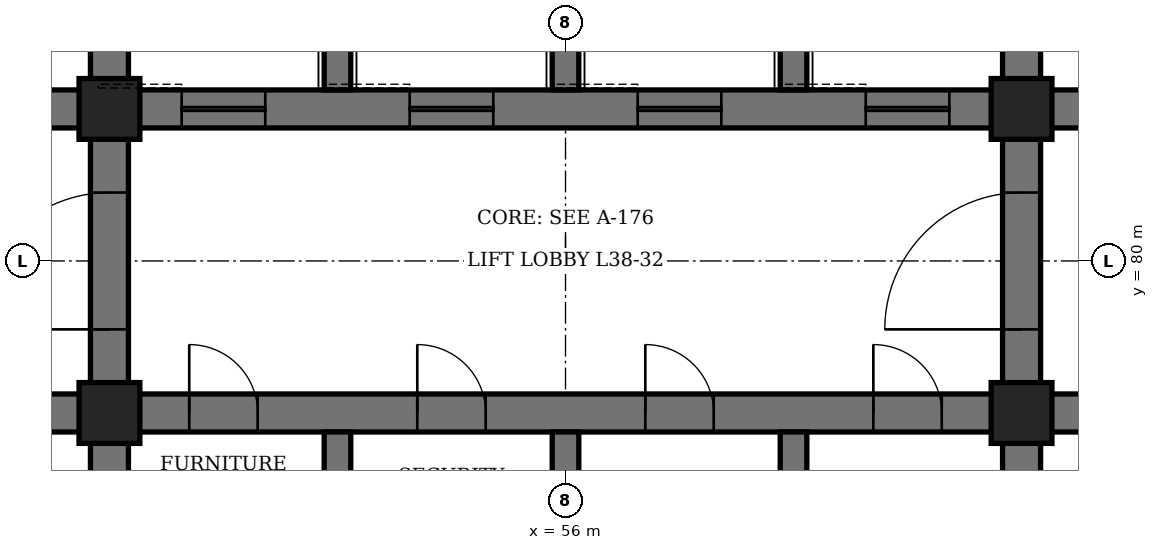
"""IFC4 building model, lengths in metres.
Left out: names, types, materials, properties, quantities, classifications, styles, units other than length and angle.
Written with IfcOpenShell. Run it as: python <this file> out.ifc"""

import sys

from ifc_helpers import new_model, si_unit, direction, frame, frame_2d, origin, origin_2d, place, context, subcontext, project, spatial, rectangle, hollow_rectangle, extrude, element, fill, save


model = new_model("IFC4")
c1 = context("Model", 3, precision=1e-05, world=origin(), true_north=direction((0.0, 1.0)))
c2 = subcontext(c1, "Body", "Model", "MODEL_VIEW")
j1 = project(units=[si_unit("LENGTHUNIT", "METRE"), si_unit("PLANEANGLEUNIT", "RADIAN")], contexts=[c1])
p1 = place(None, origin())
s1 = spatial("IfcSite", under=j1, at=p1, CompositionType="ELEMENT")
p2 = place(p1, origin())
s2 = spatial("IfcBuilding", under=s1, at=p2, CompositionType="ELEMENT")
p3 = place(p2, frame((0.0, 0.0, 171.1)))
s3 = spatial("IfcBuildingStorey", under=s2, at=p3, CompositionType="ELEMENT", Elevation=171.1)
p4 = place(p3, frame((50.0, 71.6, 0.0), z_axis=(0.0, 0.0, 1.0), x_axis=(0.0, 1.0, 0.0)))
e1 = element("IfcWall", 1, at=p4, inside=s3, PredefinedType="SHEAR", context=c2, shape_type="SweptSolid", body=[
    extrude(rectangle(XDim=16.8, YDim=0.5, at=frame_2d((8.4, 0.0))), origin(), (0.0, 0.0, 1.0), 4.2),
])
p5 = place(p4, frame((7.5, 0.0, 0.0)))
e2 = element("IfcOpeningElement", 2, at=p5, cuts=e1, PredefinedType="OPENING", context=c2, shape_type="SweptSolid", body=[
    extrude(rectangle(XDim=1.8, YDim=2.4, at=frame_2d((0.9, 1.2))), frame((0.0, 0.26, 0.0), z_axis=(0.0, -1.0, 0.0), x_axis=(1.0, 0.0, 0.0)), (0.0, 0.0, 1.0), 0.52),
])
p6 = place(p3, frame((62.0, 71.6, 0.0), z_axis=(0.0, 0.0, 1.0), x_axis=(0.0, 1.0, 0.0)))
e3 = element("IfcWall", 3, at=p6, inside=s3, PredefinedType="SHEAR", context=c2, shape_type="SweptSolid", body=[
    extrude(rectangle(XDim=16.8, YDim=0.5, at=frame_2d((8.4, 0.0))), origin(), (0.0, 0.0, 1.0), 4.2),
])
p7 = place(p6, frame((7.5, 0.0, 0.0)))
e4 = element("IfcOpeningElement", 4, at=p7, cuts=e3, PredefinedType="OPENING", context=c2, shape_type="SweptSolid", body=[
    extrude(rectangle(XDim=1.8, YDim=2.4, at=frame_2d((0.9, 1.2))), frame((0.0, 0.26, 0.0), z_axis=(0.0, -1.0, 0.0), x_axis=(1.0, 0.0, 0.0)), (0.0, 0.0, 1.0), 0.52),
])
p8 = place(p3, frame((44.6, 78.0, 0.0), z_axis=(0.0, 0.0, 1.0), x_axis=(1.0, 0.0, 0.0)))
e5 = element("IfcWall", 5, at=p8, inside=s3, PredefinedType="SHEAR", context=c2, shape_type="SweptSolid", body=[
    extrude(rectangle(XDim=5.15, YDim=0.5, at=frame_2d((2.575, 0.0))), origin(), (0.0, 0.0, 1.0), 4.2),
])
p9 = place(p8, frame((1.8, 0.0, 0.0)))
e6 = element("IfcOpeningElement", 6, at=p9, cuts=e5, PredefinedType="OPENING", context=c2, shape_type="SweptSolid", body=[
    extrude(rectangle(XDim=1.2, YDim=2.1, at=frame_2d((0.6, 1.05))), frame((0.0, 0.26, 0.0), z_axis=(0.0, -1.0, 0.0), x_axis=(1.0, 0.0, 0.0)), (0.0, 0.0, 1.0), 0.52),
])
p10 = place(p3, frame((44.6, 82.0, 0.0), z_axis=(0.0, 0.0, 1.0), x_axis=(1.0, 0.0, 0.0)))
e7 = element("IfcWall", 7, at=p10, inside=s3, PredefinedType="SHEAR", context=c2, shape_type="SweptSolid", body=[
    extrude(rectangle(XDim=5.15, YDim=0.5, at=frame_2d((2.575, 0.0))), origin(), (0.0, 0.0, 1.0), 4.2),
])
p11 = place(p10, frame((0.7, 0.0, 0.0)))
e8 = element("IfcOpeningElement", 8, at=p11, cuts=e7, PredefinedType="OPENING", context=c2, shape_type="SweptSolid", body=[
    extrude(rectangle(XDim=0.9, YDim=2.1, at=frame_2d((0.45, 1.05))), frame((0.0, 0.26, 0.0), z_axis=(0.0, -1.0, 0.0), x_axis=(1.0, 0.0, 0.0)), (0.0, 0.0, 1.0), 0.52),
])
p12 = place(p3, frame((62.25, 78.0, 0.0), z_axis=(0.0, 0.0, 1.0), x_axis=(1.0, 0.0, 0.0)))
e9 = element("IfcWall", 9, at=p12, inside=s3, PredefinedType="SHEAR", context=c2, shape_type="SweptSolid", body=[
    extrude(rectangle(XDim=5.15, YDim=0.5, at=frame_2d((2.575, 0.0))), origin(), (0.0, 0.0, 1.0), 4.2),
])
p13 = place(p12, frame((2.15, 0.0, 0.0)))
e10 = element("IfcOpeningElement", 10, at=p13, cuts=e9, PredefinedType="OPENING", context=c2, shape_type="SweptSolid", body=[
    extrude(rectangle(XDim=1.2, YDim=2.1, at=frame_2d((0.6, 1.05))), frame((0.0, 0.26, 0.0), z_axis=(0.0, -1.0, 0.0), x_axis=(1.0, 0.0, 0.0)), (0.0, 0.0, 1.0), 0.52),
])
p14 = place(p3, frame((62.25, 82.0, 0.0), z_axis=(0.0, 0.0, 1.0), x_axis=(1.0, 0.0, 0.0)))
e11 = element("IfcWall", 11, at=p14, inside=s3, PredefinedType="SHEAR", context=c2, shape_type="SweptSolid", body=[
    extrude(rectangle(XDim=5.15, YDim=0.5, at=frame_2d((2.575, 0.0))), origin(), (0.0, 0.0, 1.0), 4.2),
])
p15 = place(p14, frame((2.15, 0.0, 0.0)))
e12 = element("IfcOpeningElement", 12, at=p15, cuts=e11, PredefinedType="OPENING", context=c2, shape_type="SweptSolid", body=[
    extrude(rectangle(XDim=1.2, YDim=2.1, at=frame_2d((0.6, 1.05))), frame((0.0, 0.26, 0.0), z_axis=(0.0, -1.0, 0.0), x_axis=(1.0, 0.0, 0.0)), (0.0, 0.0, 1.0), 0.52),
])
p16 = place(p3, frame((50.25, 78.0, 0.0), z_axis=(0.0, 0.0, 1.0), x_axis=(1.0, 0.0, 0.0)))
e13 = element("IfcWall", 13, at=p16, inside=s3, PredefinedType="SHEAR", context=c2, shape_type="SweptSolid", body=[
    extrude(rectangle(XDim=11.5, YDim=0.5, at=frame_2d((5.75, 0.0))), origin(), (0.0, 0.0, 1.0), 4.2),
])
p17 = place(p16, frame((0.8, 0.0, 0.0)))
e14 = element("IfcOpeningElement", 14, at=p17, cuts=e13, PredefinedType="OPENING", context=c2, shape_type="SweptSolid", body=[
    extrude(rectangle(XDim=0.9, YDim=2.1, at=frame_2d((0.45, 1.05))), frame((0.0, 0.26, 0.0), z_axis=(0.0, -1.0, 0.0), x_axis=(1.0, 0.0, 0.0)), (0.0, 0.0, 1.0), 0.52),
])
p18 = place(p16, frame((3.8, 0.0, 0.0)))
e15 = element("IfcOpeningElement", 15, at=p18, cuts=e13, PredefinedType="OPENING", context=c2, shape_type="SweptSolid", body=[
    extrude(rectangle(XDim=0.9, YDim=2.1, at=frame_2d((0.45, 1.05))), frame((0.0, 0.26, 0.0), z_axis=(0.0, -1.0, 0.0), x_axis=(1.0, 0.0, 0.0)), (0.0, 0.0, 1.0), 0.52),
])
p19 = place(p16, frame((6.8, 0.0, 0.0)))
e16 = element("IfcOpeningElement", 16, at=p19, cuts=e13, PredefinedType="OPENING", context=c2, shape_type="SweptSolid", body=[
    extrude(rectangle(XDim=0.9, YDim=2.1, at=frame_2d((0.45, 1.05))), frame((0.0, 0.26, 0.0), z_axis=(0.0, -1.0, 0.0), x_axis=(1.0, 0.0, 0.0)), (0.0, 0.0, 1.0), 0.52),
])
p20 = place(p16, frame((9.8, 0.0, 0.0)))
e17 = element("IfcOpeningElement", 17, at=p20, cuts=e13, PredefinedType="OPENING", context=c2, shape_type="SweptSolid", body=[
    extrude(rectangle(XDim=0.9, YDim=2.1, at=frame_2d((0.45, 1.05))), frame((0.0, 0.26, 0.0), z_axis=(0.0, -1.0, 0.0), x_axis=(1.0, 0.0, 0.0)), (0.0, 0.0, 1.0), 0.52),
])
p21 = place(p3, frame((50.25, 82.0, 0.0), z_axis=(0.0, 0.0, 1.0), x_axis=(1.0, 0.0, 0.0)))
e18 = element("IfcWall", 18, at=p21, inside=s3, PredefinedType="SHEAR", context=c2, shape_type="SweptSolid", body=[
    extrude(rectangle(XDim=11.5, YDim=0.5, at=frame_2d((5.75, 0.0))), origin(), (0.0, 0.0, 1.0), 4.2),
])
p22 = place(p21, frame((0.7, 0.0, 0.0)))
e19 = element("IfcOpeningElement", 19, at=p22, cuts=e18, PredefinedType="OPENING", context=c2, shape_type="SweptSolid", body=[
    extrude(rectangle(XDim=1.1, YDim=2.2, at=frame_2d((0.55, 1.1))), frame((0.0, 0.26, 0.0), z_axis=(0.0, -1.0, 0.0), x_axis=(1.0, 0.0, 0.0)), (0.0, 0.0, 1.0), 0.52),
])
p23 = place(p21, frame((3.7, 0.0, 0.0)))
e20 = element("IfcOpeningElement", 20, at=p23, cuts=e18, PredefinedType="OPENING", context=c2, shape_type="SweptSolid", body=[
    extrude(rectangle(XDim=1.1, YDim=2.2, at=frame_2d((0.55, 1.1))), frame((0.0, 0.26, 0.0), z_axis=(0.0, -1.0, 0.0), x_axis=(1.0, 0.0, 0.0)), (0.0, 0.0, 1.0), 0.52),
])
p24 = place(p21, frame((6.7, 0.0, 0.0)))
e21 = element("IfcOpeningElement", 21, at=p24, cuts=e18, PredefinedType="OPENING", context=c2, shape_type="SweptSolid", body=[
    extrude(rectangle(XDim=1.1, YDim=2.2, at=frame_2d((0.55, 1.1))), frame((0.0, 0.26, 0.0), z_axis=(0.0, -1.0, 0.0), x_axis=(1.0, 0.0, 0.0)), (0.0, 0.0, 1.0), 0.52),
])
p25 = place(p21, frame((9.7, 0.0, 0.0)))
e22 = element("IfcOpeningElement", 22, at=p25, cuts=e18, PredefinedType="OPENING", context=c2, shape_type="SweptSolid", body=[
    extrude(rectangle(XDim=1.1, YDim=2.2, at=frame_2d((0.55, 1.1))), frame((0.0, 0.26, 0.0), z_axis=(0.0, -1.0, 0.0), x_axis=(1.0, 0.0, 0.0)), (0.0, 0.0, 1.0), 0.52),
])
p26 = place(p3, frame((53.0, 74.175, 0.0), z_axis=(0.0, 0.0, 1.0), x_axis=(0.0, 1.0, 0.0)))
e23 = element("IfcWall", 23, at=p26, inside=s3, PredefinedType="SHEAR", context=c2, shape_type="SweptSolid", body=[
    extrude(rectangle(XDim=3.575, YDim=0.35, at=frame_2d((1.788, 0.0))), origin(), (0.0, 0.0, 1.0), 4.2),
])
p27 = place(p3, frame((53.0, 82.25, 0.0), z_axis=(0.0, 0.0, 1.0), x_axis=(0.0, 1.0, 0.0)))
e24 = element("IfcWall", 24, at=p27, inside=s3, PredefinedType="SHEAR", context=c2, shape_type="SweptSolid", body=[
    extrude(rectangle(XDim=3.5, YDim=0.35, at=frame_2d((1.75, 0.0))), origin(), (0.0, 0.0, 1.0), 4.2),
])
p28 = place(p3, frame((56.0, 74.175, 0.0), z_axis=(0.0, 0.0, 1.0), x_axis=(0.0, 1.0, 0.0)))
e25 = element("IfcWall", 25, at=p28, inside=s3, PredefinedType="SHEAR", context=c2, shape_type="SweptSolid", body=[
    extrude(rectangle(XDim=3.575, YDim=0.35, at=frame_2d((1.788, 0.0))), origin(), (0.0, 0.0, 1.0), 4.2),
])
p29 = place(p3, frame((56.0, 82.25, 0.0), z_axis=(0.0, 0.0, 1.0), x_axis=(0.0, 1.0, 0.0)))
e26 = element("IfcWall", 26, at=p29, inside=s3, PredefinedType="SHEAR", context=c2, shape_type="SweptSolid", body=[
    extrude(rectangle(XDim=3.5, YDim=0.35, at=frame_2d((1.75, 0.0))), origin(), (0.0, 0.0, 1.0), 4.2),
])
p30 = place(p3, frame((59.0, 74.175, 0.0), z_axis=(0.0, 0.0, 1.0), x_axis=(0.0, 1.0, 0.0)))
e27 = element("IfcWall", 27, at=p30, inside=s3, PredefinedType="SHEAR", context=c2, shape_type="SweptSolid", body=[
    extrude(rectangle(XDim=3.575, YDim=0.35, at=frame_2d((1.788, 0.0))), origin(), (0.0, 0.0, 1.0), 4.2),
])
p31 = place(p3, frame((59.0, 82.25, 0.0), z_axis=(0.0, 0.0, 1.0), x_axis=(0.0, 1.0, 0.0)))
e28 = element("IfcWall", 28, at=p31, inside=s3, PredefinedType="SHEAR", context=c2, shape_type="SweptSolid", body=[
    extrude(rectangle(XDim=3.5, YDim=0.35, at=frame_2d((1.75, 0.0))), origin(), (0.0, 0.0, 1.0), 4.2),
])
for number, where, z_axis, x_axis in (
    (29, (50.0, 78.0, 0.0), (0.0, 0.0, 1.0), (1.0, 0.0, 0.0)),
    (30, (50.0, 82.0, 0.0), (0.0, 0.0, 1.0), (1.0, 0.0, 0.0)),
    (31, (62.0, 78.0, 0.0), (0.0, 0.0, 1.0), (1.0, 0.0, 0.0)),
    (32, (62.0, 82.0, 0.0), (0.0, 0.0, 1.0), (1.0, 0.0, 0.0)),
):
    element("IfcColumn", number, at=place(p3, frame(where, z_axis=z_axis, x_axis=x_axis)), inside=s3, PredefinedType="COLUMN", context=c2, shape_type="SweptSolid", body=[
        extrude(hollow_rectangle(XDim=0.8, YDim=0.8, WallThickness=0.1, at=origin_2d()), origin(), (0.0, 0.0, 1.0), 4.2),
    ])
p32 = place(p17, origin())
e33 = element("IfcDoor", 33, at=p32, inside=s3, OperationType="SINGLE_SWING_LEFT", PredefinedType="DOOR", context=c2, shape_type="SweptSolid", body=[
    extrude(rectangle(XDim=0.9, YDim=2.1, at=frame_2d((0.45, 1.05))), frame((0.0, 0.25, 0.0), z_axis=(0.0, -1.0, 0.0), x_axis=(1.0, 0.0, 0.0)), (0.0, 0.0, 1.0), 0.5),
])
fill(e14, e33)
p33 = place(p18, origin())
e34 = element("IfcDoor", 34, at=p33, inside=s3, OperationType="SINGLE_SWING_LEFT", PredefinedType="DOOR", context=c2, shape_type="SweptSolid", body=[
    extrude(rectangle(XDim=0.9, YDim=2.1, at=frame_2d((0.45, 1.05))), frame((0.0, 0.25, 0.0), z_axis=(0.0, -1.0, 0.0), x_axis=(1.0, 0.0, 0.0)), (0.0, 0.0, 1.0), 0.5),
])
fill(e15, e34)
p34 = place(p19, origin())
e35 = element("IfcDoor", 35, at=p34, inside=s3, OperationType="SINGLE_SWING_LEFT", PredefinedType="DOOR", context=c2, shape_type="SweptSolid", body=[
    extrude(rectangle(XDim=0.9, YDim=2.1, at=frame_2d((0.45, 1.05))), frame((0.0, 0.25, 0.0), z_axis=(0.0, -1.0, 0.0), x_axis=(1.0, 0.0, 0.0)), (0.0, 0.0, 1.0), 0.5),
])
fill(e16, e35)
p35 = place(p20, origin())
e36 = element("IfcDoor", 36, at=p35, inside=s3, OperationType="SINGLE_SWING_LEFT", PredefinedType="DOOR", context=c2, shape_type="SweptSolid", body=[
    extrude(rectangle(XDim=0.9, YDim=2.1, at=frame_2d((0.45, 1.05))), frame((0.0, 0.25, 0.0), z_axis=(0.0, -1.0, 0.0), x_axis=(1.0, 0.0, 0.0)), (0.0, 0.0, 1.0), 0.5),
])
fill(e17, e36)
p36 = place(p5, origin())
e37 = element("IfcDoor", 37, at=p36, inside=s3, OperationType="DOUBLE_DOOR_SINGLE_SWING", PredefinedType="DOOR", context=c2, shape_type="SweptSolid", body=[
    extrude(rectangle(XDim=1.8, YDim=2.4, at=frame_2d((0.9, 1.2))), frame((0.0, 0.25, 0.0), z_axis=(0.0, -1.0, 0.0), x_axis=(1.0, 0.0, 0.0)), (0.0, 0.0, 1.0), 0.5),
])
fill(e2, e37)
p37 = place(p7, origin())
e38 = element("IfcDoor", 38, at=p37, inside=s3, OperationType="DOUBLE_DOOR_SINGLE_SWING", PredefinedType="DOOR", context=c2, shape_type="SweptSolid", body=[
    extrude(rectangle(XDim=1.8, YDim=2.4, at=frame_2d((0.9, 1.2))), frame((0.0, 0.25, 0.0), z_axis=(0.0, -1.0, 0.0), x_axis=(1.0, 0.0, 0.0)), (0.0, 0.0, 1.0), 0.5),
])
fill(e4, e38)
p38 = place(p22, origin())
e39 = element("IfcDoor", 39, at=p38, inside=s3, OperationType="SLIDING_TO_LEFT", PredefinedType="DOOR", context=c2, shape_type="SweptSolid", body=[
    extrude(rectangle(XDim=1.1, YDim=2.2, at=frame_2d((0.55, 1.1))), frame((0.0, 0.25, 0.0), z_axis=(0.0, -1.0, 0.0), x_axis=(1.0, 0.0, 0.0)), (0.0, 0.0, 1.0), 0.5),
])
fill(e19, e39)
p39 = place(p23, origin())
e40 = element("IfcDoor", 40, at=p39, inside=s3, OperationType="SLIDING_TO_LEFT", PredefinedType="DOOR", context=c2, shape_type="SweptSolid", body=[
    extrude(rectangle(XDim=1.1, YDim=2.2, at=frame_2d((0.55, 1.1))), frame((0.0, 0.25, 0.0), z_axis=(0.0, -1.0, 0.0), x_axis=(1.0, 0.0, 0.0)), (0.0, 0.0, 1.0), 0.5),
])
fill(e20, e40)
p40 = place(p24, origin())
e41 = element("IfcDoor", 41, at=p40, inside=s3, OperationType="SLIDING_TO_LEFT", PredefinedType="DOOR", context=c2, shape_type="SweptSolid", body=[
    extrude(rectangle(XDim=1.1, YDim=2.2, at=frame_2d((0.55, 1.1))), frame((0.0, 0.25, 0.0), z_axis=(0.0, -1.0, 0.0), x_axis=(1.0, 0.0, 0.0)), (0.0, 0.0, 1.0), 0.5),
])
fill(e21, e41)
p41 = place(p25, origin())
e42 = element("IfcDoor", 42, at=p41, inside=s3, OperationType="SLIDING_TO_LEFT", PredefinedType="DOOR", context=c2, shape_type="SweptSolid", body=[
    extrude(rectangle(XDim=1.1, YDim=2.2, at=frame_2d((0.55, 1.1))), frame((0.0, 0.25, 0.0), z_axis=(0.0, -1.0, 0.0), x_axis=(1.0, 0.0, 0.0)), (0.0, 0.0, 1.0), 0.5),
])
fill(e22, e42)
save(model, sys.argv[1])
